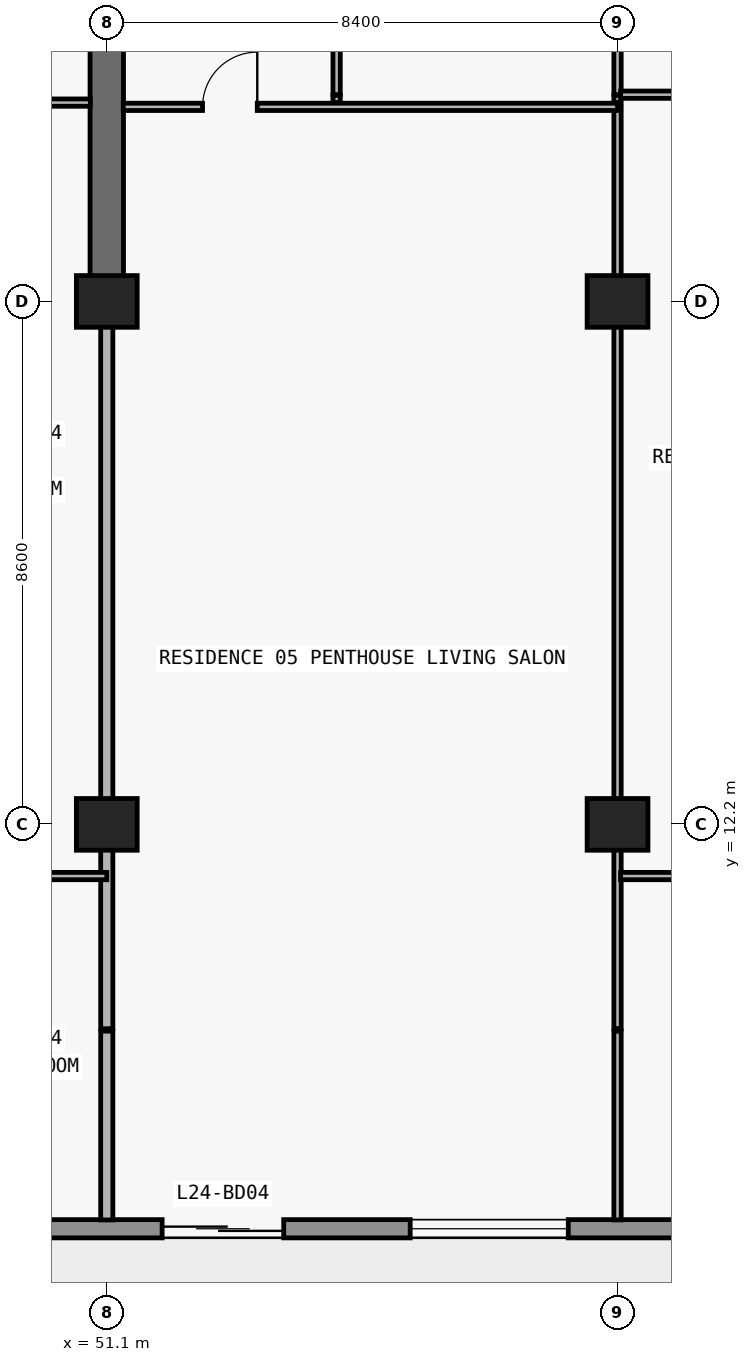
"""IFC4 building model, lengths in metres.
Left out: names, types, materials, properties, quantities, classifications, styles, units other than length and angle.
Written with IfcOpenShell. Run it as: python <this file> out.ifc"""

import sys

from ifc_helpers import new_model, si_unit, direction, frame, frame_2d, origin, origin_2d, place, context, subcontext, project, spatial, rectangle, extrude, element, fill, save


model = new_model("IFC4")
c1 = context("Model", 3, precision=1e-05, world=origin(), true_north=direction((0.0, 1.0)))
c2 = subcontext(c1, "Body", "Model", "MODEL_VIEW")
j1 = project(units=[si_unit("LENGTHUNIT", "METRE"), si_unit("PLANEANGLEUNIT", "RADIAN")], contexts=[c1])
p1 = place(None, origin())
s1 = spatial("IfcSite", under=j1, at=p1, CompositionType="ELEMENT")
p2 = place(p1, origin())
s2 = spatial("IfcBuilding", under=s1, at=p2, CompositionType="ELEMENT")
p3 = place(p2, frame((0.0, 0.0, 91.2)))
s3 = spatial("IfcBuildingStorey", under=s2, at=p3, CompositionType="ELEMENT", Elevation=91.2)
for number, where, z_axis, x_axis in (
    (1, (51.1, 12.2, 0.0), (0.0, 0.0, 1.0), (1.0, 0.0, 0.0)),
    (2, (59.5, 12.2, 0.0), (0.0, 0.0, 1.0), (1.0, 0.0, 0.0)),
    (3, (51.1, 20.8, 0.0), (0.0, 0.0, 1.0), (1.0, 0.0, 0.0)),
    (4, (59.5, 20.8, 0.0), (0.0, 0.0, 1.0), (1.0, 0.0, 0.0)),
):
    element("IfcColumn", number, at=place(p3, frame(where, z_axis=z_axis, x_axis=x_axis)), inside=s3, PredefinedType="COLUMN", context=c2, shape_type="SweptSolid", body=[
        extrude(rectangle(XDim=1.0, YDim=0.85, at=origin_2d()), origin(), (0.0, 0.0, 1.0), 3.05),
    ])
p4 = place(p3, frame((51.1, 20.8, 0.0), z_axis=(0.0, 0.0, 1.0), x_axis=(0.0, 1.0, 0.0)))
e5 = element("IfcWall", 5, at=p4, inside=s3, PredefinedType="SHEAR", context=c2, shape_type="SweptSolid", body=[
    extrude(rectangle(XDim=8.6, YDim=0.55, at=frame_2d((4.3, 0.0))), origin(), (0.0, 0.0, 1.0), 3.05),
])
p5 = place(p3, frame((70.1, 5.55, 0.0), z_axis=(0.0, 0.0, 1.0), x_axis=(-1.0, 0.0, 0.0)))
e6 = element("IfcWall", 6, at=p5, inside=s3, PredefinedType="STANDARD", context=c2, shape_type="SweptSolid", body=[
    extrude(rectangle(XDim=62.4, YDim=0.3, at=frame_2d((31.2, 0.0))), origin(), (0.0, 0.0, 1.0), 3.05),
])
p6 = place(p5, frame((57.29, 0.0, 0.0)))
e7 = element("IfcOpeningElement", 7, at=p6, cuts=e6, PredefinedType="OPENING", context=c2, shape_type="SweptSolid", body=[
    extrude(rectangle(XDim=2.0, YDim=2.3, at=frame_2d((1.0, 1.15))), frame((0.0, 0.16, 0.0), z_axis=(0.0, -1.0, 0.0), x_axis=(1.0, 0.0, 0.0)), (0.0, 0.0, 1.0), 0.32),
])
p7 = place(p5, frame((52.61, 0.0, 0.65)))
e8 = element("IfcOpeningElement", 8, at=p7, cuts=e6, PredefinedType="OPENING", context=c2, shape_type="SweptSolid", body=[
    extrude(rectangle(XDim=2.6, YDim=1.85, at=frame_2d((1.3, 0.925))), frame((0.0, 0.16, 0.0), z_axis=(0.0, -1.0, 0.0), x_axis=(1.0, 0.0, 0.0)), (0.0, 0.0, 1.0), 0.32),
])
p8 = place(p5, frame((46.5, 0.0, 0.85)))
e9 = element("IfcOpeningElement", 9, at=p8, cuts=e6, PredefinedType="OPENING", context=c2, shape_type="SweptSolid", body=[
    extrude(rectangle(XDim=2.2, YDim=1.55, at=frame_2d((1.1, 0.775))), frame((0.0, 0.16, 0.0), z_axis=(0.0, -1.0, 0.0), x_axis=(1.0, 0.0, 0.0)), (0.0, 0.0, 1.0), 0.32),
])
p9 = place(p5, frame((40.09, 0.0, 0.0)))
e10 = element("IfcOpeningElement", 10, at=p9, cuts=e6, PredefinedType="OPENING", context=c2, shape_type="SweptSolid", body=[
    extrude(rectangle(XDim=2.0, YDim=2.3, at=frame_2d((1.0, 1.15))), frame((0.0, 0.16, 0.0), z_axis=(0.0, -1.0, 0.0), x_axis=(1.0, 0.0, 0.0)), (0.0, 0.0, 1.0), 0.32),
])
p10 = place(p5, frame((35.99, 0.0, 0.85)))
e11 = element("IfcOpeningElement", 11, at=p10, cuts=e6, PredefinedType="OPENING", context=c2, shape_type="SweptSolid", body=[
    extrude(rectangle(XDim=1.8, YDim=1.55, at=frame_2d((0.9, 0.775))), frame((0.0, 0.16, 0.0), z_axis=(0.0, -1.0, 0.0), x_axis=(1.0, 0.0, 0.0)), (0.0, 0.0, 1.0), 0.32),
])
p11 = place(p5, frame((28.314, 0.0, 0.85)))
e12 = element("IfcOpeningElement", 12, at=p11, cuts=e6, PredefinedType="OPENING", context=c2, shape_type="SweptSolid", body=[
    extrude(rectangle(XDim=2.2, YDim=1.55, at=frame_2d((1.1, 0.775))), frame((0.0, 0.16, 0.0), z_axis=(0.0, -1.0, 0.0), x_axis=(1.0, 0.0, 0.0)), (0.0, 0.0, 1.0), 0.32),
])
p12 = place(p5, frame((24.09, 0.0, 0.0)))
e13 = element("IfcOpeningElement", 13, at=p12, cuts=e6, PredefinedType="OPENING", context=c2, shape_type="SweptSolid", body=[
    extrude(rectangle(XDim=2.0, YDim=2.3, at=frame_2d((1.0, 1.15))), frame((0.0, 0.16, 0.0), z_axis=(0.0, -1.0, 0.0), x_axis=(1.0, 0.0, 0.0)), (0.0, 0.0, 1.0), 0.32),
])
p13 = place(p5, frame((19.99, 0.0, 0.85)))
e14 = element("IfcOpeningElement", 14, at=p13, cuts=e6, PredefinedType="OPENING", context=c2, shape_type="SweptSolid", body=[
    extrude(rectangle(XDim=1.8, YDim=1.55, at=frame_2d((0.9, 0.775))), frame((0.0, 0.16, 0.0), z_axis=(0.0, -1.0, 0.0), x_axis=(1.0, 0.0, 0.0)), (0.0, 0.0, 1.0), 0.32),
])
p14 = place(p5, frame((16.09, 0.0, 0.0)))
e15 = element("IfcOpeningElement", 15, at=p14, cuts=e6, PredefinedType="OPENING", context=c2, shape_type="SweptSolid", body=[
    extrude(rectangle(XDim=2.0, YDim=2.3, at=frame_2d((1.0, 1.15))), frame((0.0, 0.16, 0.0), z_axis=(0.0, -1.0, 0.0), x_axis=(1.0, 0.0, 0.0)), (0.0, 0.0, 1.0), 0.32),
])
p15 = place(p5, frame((11.41, 0.0, 0.65)))
e16 = element("IfcOpeningElement", 16, at=p15, cuts=e6, PredefinedType="OPENING", context=c2, shape_type="SweptSolid", body=[
    extrude(rectangle(XDim=2.6, YDim=1.85, at=frame_2d((1.3, 0.925))), frame((0.0, 0.16, 0.0), z_axis=(0.0, -1.0, 0.0), x_axis=(1.0, 0.0, 0.0)), (0.0, 0.0, 1.0), 0.32),
])
p16 = place(p5, frame((5.3, 0.0, 0.85)))
e17 = element("IfcOpeningElement", 17, at=p16, cuts=e6, PredefinedType="OPENING", context=c2, shape_type="SweptSolid", body=[
    extrude(rectangle(XDim=2.2, YDim=1.55, at=frame_2d((1.1, 0.775))), frame((0.0, 0.16, 0.0), z_axis=(0.0, -1.0, 0.0), x_axis=(1.0, 0.0, 0.0)), (0.0, 0.0, 1.0), 0.32),
])
p17 = place(p3, frame((51.1, 5.695, 0.0), z_axis=(0.0, 0.0, 1.0), x_axis=(0.0, 1.0, 0.0)))
e18 = element("IfcWall", 18, at=p17, inside=s3, PredefinedType="PARTITIONING", context=c2, shape_type="SweptSolid", body=[
    extrude(rectangle(XDim=3.105, YDim=0.2, at=frame_2d((1.552, 0.0))), origin(), (0.0, 0.0, 1.0), 3.05),
])
p18 = place(p3, frame((51.1, 8.84, 0.0), z_axis=(0.0, 0.0, 1.0), x_axis=(0.0, 1.0, 0.0)))
e19 = element("IfcWall", 19, at=p18, inside=s3, PredefinedType="PARTITIONING", context=c2, shape_type="SweptSolid", body=[
    extrude(rectangle(XDim=11.955, YDim=0.2, at=frame_2d((5.978, 0.0))), origin(), (0.0, 0.0, 1.0), 2.174),
])
p19 = place(p3, frame((54.88, 24.07, 0.0), z_axis=(0.0, 0.0, 1.0), x_axis=(0.0, 1.0, 0.0)))
e20 = element("IfcWall", 20, at=p19, inside=s3, PredefinedType="PARTITIONING", context=c2, shape_type="SweptSolid", body=[
    extrude(rectangle(XDim=0.12, YDim=0.12, at=frame_2d((0.06, 0.0))), origin(), (0.0, 0.0, 1.0), 3.05),
])
p20 = place(p3, frame((54.88, 24.2, 0.0), z_axis=(0.0, 0.0, 1.0), x_axis=(0.0, 1.0, 0.0)))
e21 = element("IfcWall", 21, at=p20, inside=s3, PredefinedType="PARTITIONING", context=c2, shape_type="SweptSolid", body=[
    extrude(rectangle(XDim=4.6, YDim=0.12, at=frame_2d((2.3, 0.0))), origin(), (0.0, 0.0, 1.0), 3.05),
])
p21 = place(p20, frame((1.85, 0.0, 0.0)))
e22 = element("IfcOpeningElement", 22, at=p21, cuts=e21, PredefinedType="OPENING", context=c2, shape_type="SweptSolid", body=[
    extrude(rectangle(XDim=0.9, YDim=2.15, at=frame_2d((0.45, 1.075))), frame((0.0, 0.07, 0.0), z_axis=(0.0, -1.0, 0.0), x_axis=(1.0, 0.0, 0.0)), (0.0, 0.0, 1.0), 0.14),
])
p22 = place(p3, frame((59.5, 5.695, 0.0), z_axis=(0.0, 0.0, 1.0), x_axis=(0.0, 1.0, 0.0)))
e23 = element("IfcWall", 23, at=p22, inside=s3, PredefinedType="PARTITIONING", context=c2, shape_type="SweptSolid", body=[
    extrude(rectangle(XDim=3.105, YDim=0.12, at=frame_2d((1.552, 0.0))), origin(), (0.0, 0.0, 1.0), 3.05),
])
p23 = place(p3, frame((59.5, 8.84, 0.0), z_axis=(0.0, 0.0, 1.0), x_axis=(0.0, 1.0, 0.0)))
e24 = element("IfcWall", 24, at=p23, inside=s3, PredefinedType="PARTITIONING", context=c2, shape_type="SweptSolid", body=[
    extrude(rectangle(XDim=15.16, YDim=0.12, at=frame_2d((7.58, 0.0))), origin(), (0.0, 0.0, 1.0), 2.174),
])
p24 = place(p3, frame((59.5, 24.07, 0.0), z_axis=(0.0, 0.0, 1.0), x_axis=(0.0, 1.0, 0.0)))
e25 = element("IfcWall", 25, at=p24, inside=s3, PredefinedType="PARTITIONING", context=c2, shape_type="SweptSolid", body=[
    extrude(rectangle(XDim=0.12, YDim=0.12, at=frame_2d((0.06, 0.0))), origin(), (0.0, 0.0, 1.0), 2.174),
])
p25 = place(p3, frame((59.5, 24.2, 0.0), z_axis=(0.0, 0.0, 1.0), x_axis=(0.0, 1.0, 0.0)))
e26 = element("IfcWall", 26, at=p25, inside=s3, PredefinedType="PARTITIONING", context=c2, shape_type="SweptSolid", body=[
    extrude(rectangle(XDim=5.14, YDim=0.12, at=frame_2d((2.57, 0.0))), origin(), (0.0, 0.0, 1.0), 2.174),
])
p26 = place(p25, frame((1.75, 0.0, 0.0)))
e27 = element("IfcOpeningElement", 27, at=p26, cuts=e26, PredefinedType="OPENING", context=c2, shape_type="SweptSolid", body=[
    extrude(rectangle(XDim=0.9, YDim=2.124, at=frame_2d((0.45, 1.062))), frame((0.0, 0.07, 0.0), z_axis=(0.0, -1.0, 0.0), x_axis=(1.0, 0.0, 0.0)), (0.0, 0.0, 1.0), 0.14),
])
p27 = place(p3, frame((47.32, 11.35, 0.0), z_axis=(0.0, 0.0, 1.0), x_axis=(1.0, 0.0, 0.0)))
e28 = element("IfcWall", 28, at=p27, inside=s3, PredefinedType="PARTITIONING", context=c2, shape_type="SweptSolid", body=[
    extrude(rectangle(XDim=3.78, YDim=0.12, at=frame_2d((1.89, 0.0))), origin(), (0.0, 0.0, 1.0), 3.05),
])
p28 = place(p27, frame((1.44, 0.0, 0.0)))
e29 = element("IfcOpeningElement", 29, at=p28, cuts=e28, PredefinedType="OPENING", context=c2, shape_type="SweptSolid", body=[
    extrude(rectangle(XDim=0.9, YDim=2.15, at=frame_2d((0.45, 1.075))), frame((0.0, 0.07, 0.0), z_axis=(0.0, -1.0, 0.0), x_axis=(1.0, 0.0, 0.0)), (0.0, 0.0, 1.0), 0.14),
])
p29 = place(p3, frame((59.55, 11.35, 0.0), z_axis=(0.0, 0.0, 1.0), x_axis=(1.0, 0.0, 0.0)))
e30 = element("IfcWall", 30, at=p29, inside=s3, PredefinedType="PARTITIONING", context=c2, shape_type="SweptSolid", body=[
    extrude(rectangle(XDim=8.35, YDim=0.12, at=frame_2d((4.175, 0.0))), origin(), (0.0, 0.0, 1.0), 3.05),
])
p30 = place(p29, frame((3.725, 0.0, 0.0)))
e31 = element("IfcOpeningElement", 31, at=p30, cuts=e30, PredefinedType="OPENING", context=c2, shape_type="SweptSolid", body=[
    extrude(rectangle(XDim=0.9, YDim=2.15, at=frame_2d((0.45, 1.075))), frame((0.0, 0.07, 0.0), z_axis=(0.0, -1.0, 0.0), x_axis=(1.0, 0.0, 0.0)), (0.0, 0.0, 1.0), 0.14),
])
p31 = place(p3, frame((51.37, 24.0, 0.0), z_axis=(0.0, 0.0, 1.0), x_axis=(1.0, 0.0, 0.0)))
e32 = element("IfcWall", 32, at=p31, inside=s3, PredefinedType="PARTITIONING", context=c2, shape_type="SweptSolid", body=[
    extrude(rectangle(XDim=8.13, YDim=0.12, at=frame_2d((4.065, 0.0))), origin(), (0.0, 0.0, 1.0), 3.05),
])
p32 = place(p31, frame((1.305, 0.0, 0.0)))
e33 = element("IfcOpeningElement", 33, at=p32, cuts=e32, PredefinedType="OPENING", context=c2, shape_type="SweptSolid", body=[
    extrude(rectangle(XDim=0.9, YDim=2.15, at=frame_2d((0.45, 1.075))), frame((0.0, 0.07, 0.0), z_axis=(0.0, -1.0, 0.0), x_axis=(1.0, 0.0, 0.0)), (0.0, 0.0, 1.0), 0.14),
])
p33 = place(p3, frame((42.7, 24.07, 0.0), z_axis=(0.0, 0.0, 1.0), x_axis=(1.0, 0.0, 0.0)))
e34 = element("IfcWall", 34, at=p33, inside=s3, PredefinedType="PARTITIONING", context=c2, shape_type="SweptSolid", body=[
    extrude(rectangle(XDim=8.13, YDim=0.12, at=frame_2d((4.065, 0.0))), origin(), (0.0, 0.0, 1.0), 3.05),
])
p34 = place(p33, frame((1.86, 0.0, 0.0)))
e35 = element("IfcOpeningElement", 35, at=p34, cuts=e34, PredefinedType="OPENING", context=c2, shape_type="SweptSolid", body=[
    extrude(rectangle(XDim=0.9, YDim=2.15, at=frame_2d((0.45, 1.075))), frame((0.0, 0.07, 0.0), z_axis=(0.0, -1.0, 0.0), x_axis=(1.0, 0.0, 0.0)), (0.0, 0.0, 1.0), 0.14),
])
p35 = place(p33, frame((6.008, 0.0, 0.0)))
e36 = element("IfcOpeningElement", 36, at=p35, cuts=e34, PredefinedType="OPENING", context=c2, shape_type="SweptSolid", body=[
    extrude(rectangle(XDim=0.9, YDim=2.15, at=frame_2d((0.45, 1.075))), frame((0.0, 0.07, 0.0), z_axis=(0.0, -1.0, 0.0), x_axis=(1.0, 0.0, 0.0)), (0.0, 0.0, 1.0), 0.14),
])
p36 = place(p3, frame((59.55, 24.2, 0.0), z_axis=(0.0, 0.0, 1.0), x_axis=(1.0, 0.0, 0.0)))
e37 = element("IfcWall", 37, at=p36, inside=s3, PredefinedType="PARTITIONING", context=c2, shape_type="SweptSolid", body=[
    extrude(rectangle(XDim=8.35, YDim=0.12, at=frame_2d((4.175, 0.0))), origin(), (0.0, 0.0, 1.0), 3.05),
])
p37 = place(p36, frame((3.725, 0.0, 0.0)))
e38 = element("IfcOpeningElement", 38, at=p37, cuts=e37, PredefinedType="OPENING", context=c2, shape_type="SweptSolid", body=[
    extrude(rectangle(XDim=0.9, YDim=2.15, at=frame_2d((0.45, 1.075))), frame((0.0, 0.07, 0.0), z_axis=(0.0, -1.0, 0.0), x_axis=(1.0, 0.0, 0.0)), (0.0, 0.0, 1.0), 0.14),
])
p38 = place(p14, origin())
e39 = element("IfcDoor", 39, at=p38, inside=s3, OperationType="DOUBLE_DOOR_SLIDING", PredefinedType="DOOR", context=c2, shape_type="SweptSolid", body=[
    extrude(rectangle(XDim=2.0, YDim=2.3, at=frame_2d((1.0, 1.15))), frame((0.0, 0.025, 0.0), z_axis=(0.0, -1.0, 0.0), x_axis=(1.0, 0.0, 0.0)), (0.0, 0.0, 1.0), 0.05),
])
fill(e15, e39)
p39 = place(p15, origin())
e40 = element("IfcWindow", 40, at=p39, inside=s3, PartitioningType="SINGLE_PANEL", PredefinedType="WINDOW", context=c2, shape_type="SweptSolid", body=[
    extrude(rectangle(XDim=2.6, YDim=1.85, at=frame_2d((1.3, 0.925))), frame((0.0, 0.03, 0.0), z_axis=(0.0, -1.0, 0.0), x_axis=(1.0, 0.0, 0.0)), (0.0, 0.0, 1.0), 0.06),
])
fill(e16, e40)
p40 = place(p32, origin())
e41 = element("IfcDoor", 41, at=p40, inside=s3, OperationType="SINGLE_SWING_RIGHT", PredefinedType="DOOR", context=c2, shape_type="SweptSolid", body=[
    extrude(rectangle(XDim=0.9, YDim=2.15, at=frame_2d((0.45, 1.075))), frame((0.0, 0.025, 0.0), z_axis=(0.0, -1.0, 0.0), x_axis=(1.0, 0.0, 0.0)), (0.0, 0.0, 1.0), 0.05),
])
fill(e33, e41)
save(model, sys.argv[1])
